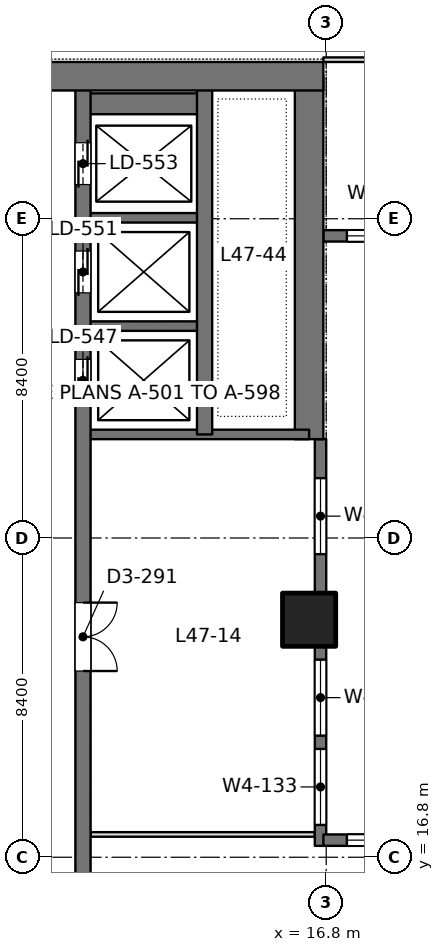
"""IFC4 building model, lengths in metres.
Left out: names, types, materials, properties, quantities, classifications, styles, units other than length and angle.
Written with IfcOpenShell. Run it as: python <this file> out.ifc"""

import sys

from ifc_helpers import new_model, si_unit, direction, frame, frame_2d, origin, origin_2d, place, context, subcontext, project, spatial, rectangle, extrude, element, fill, save


model = new_model("IFC4")
c1 = context("Model", 3, precision=1e-05, world=origin(), true_north=direction((0.0, 1.0)))
c2 = subcontext(c1, "Body", "Model", "MODEL_VIEW")
j1 = project(units=[si_unit("LENGTHUNIT", "METRE"), si_unit("PLANEANGLEUNIT", "RADIAN")], contexts=[c1])
p1 = place(None, origin())
s1 = spatial("IfcSite", under=j1, at=p1, CompositionType="ELEMENT")
p2 = place(p1, origin())
s2 = spatial("IfcBuilding", under=s1, at=p2, CompositionType="ELEMENT")
p3 = place(p2, frame((0.0, 0.0, 207.0)))
s3 = spatial("IfcBuildingStorey", under=s2, at=p3, CompositionType="ELEMENT", Elevation=207.0)
p4 = place(p3, frame((16.35, 23.05, 0.0), z_axis=(0.0, 0.0, 1.0), x_axis=(1.0, 0.0, 0.0)))
e1 = element("IfcColumn", 1, at=p4, inside=s3, PredefinedType="COLUMN", context=c2, shape_type="SweptSolid", body=[
    extrude(rectangle(XDim=1.4, YDim=1.4, at=origin_2d()), origin(), (0.0, 0.0, 1.0), 4.2),
])
p5 = place(p3, frame((-1.125, 37.35, 0.0), z_axis=(0.0, 0.0, 1.0), x_axis=(1.0, 0.0, 0.0)))
e2 = element("IfcWall", 2, at=p5, inside=s3, PredefinedType="SHEAR", context=c2, shape_type="SweptSolid", body=[
    extrude(rectangle(XDim=17.85, YDim=0.75, at=frame_2d((8.925, 0.0))), origin(), (0.0, 0.0, 1.0), 4.2),
])
p6 = place(p5, frame((8.875, 0.0, 0.0)))
e3 = element("IfcOpeningElement", 3, at=p6, cuts=e2, PredefinedType="OPENING", context=c2, shape_type="SweptSolid", body=[
    extrude(rectangle(XDim=1.8, YDim=2.4, at=frame_2d((0.9, 1.2))), frame((0.0, 0.385, 0.0), z_axis=(0.0, -1.0, 0.0), x_axis=(1.0, 0.0, 0.0)), (0.0, 0.0, 1.0), 0.77),
])
p7 = place(p3, frame((16.35, 27.8, 0.0), z_axis=(0.0, 0.0, 1.0), x_axis=(0.0, 1.0, 0.0)))
e4 = element("IfcWall", 4, at=p7, inside=s3, PredefinedType="SHEAR", context=c2, shape_type="SweptSolid", body=[
    extrude(rectangle(XDim=9.55, YDim=0.75, at=frame_2d((4.775, 0.0))), origin(), (0.0, 0.0, 1.0), 4.2),
])
p8 = place(p3, frame((10.4, 13.05, 0.0), z_axis=(0.0, 0.0, 1.0), x_axis=(0.0, 1.0, 0.0)))
e5 = element("IfcWall", 5, at=p8, inside=s3, PredefinedType="SHEAR", context=c2, shape_type="SweptSolid", body=[
    extrude(rectangle(XDim=24.3, YDim=0.4, at=frame_2d((12.15, 0.0))), origin(), (0.0, 0.0, 1.0), 4.2),
])
p9 = place(p8, frame((15.75, 0.0, 0.0)))
e6 = element("IfcOpeningElement", 6, at=p9, cuts=e5, PredefinedType="OPENING", context=c2, shape_type="SweptSolid", body=[
    extrude(rectangle(XDim=1.1, YDim=2.2, at=frame_2d((0.55, 1.1))), frame((0.0, 0.21, 0.0), z_axis=(0.0, -1.0, 0.0), x_axis=(1.0, 0.0, 0.0)), (0.0, 0.0, 1.0), 0.42),
])
p10 = place(p8, frame((18.6, 0.0, 0.0)))
e7 = element("IfcOpeningElement", 7, at=p10, cuts=e5, PredefinedType="OPENING", context=c2, shape_type="SweptSolid", body=[
    extrude(rectangle(XDim=1.1, YDim=2.2, at=frame_2d((0.55, 1.1))), frame((0.0, 0.21, 0.0), z_axis=(0.0, -1.0, 0.0), x_axis=(1.0, 0.0, 0.0)), (0.0, 0.0, 1.0), 0.42),
])
p11 = place(p8, frame((21.45, 0.0, 0.0)))
e8 = element("IfcOpeningElement", 8, at=p11, cuts=e5, PredefinedType="OPENING", context=c2, shape_type="SweptSolid", body=[
    extrude(rectangle(XDim=1.1, YDim=2.2, at=frame_2d((0.55, 1.1))), frame((0.0, 0.21, 0.0), z_axis=(0.0, -1.0, 0.0), x_axis=(1.0, 0.0, 0.0)), (0.0, 0.0, 1.0), 0.42),
])
p12 = place(p8, frame((8.65, 0.0, 0.0)))
e9 = element("IfcOpeningElement", 9, at=p12, cuts=e5, PredefinedType="OPENING", context=c2, shape_type="SweptSolid", body=[
    extrude(rectangle(XDim=1.8, YDim=2.4, at=frame_2d((0.9, 1.2))), frame((0.0, 0.21, 0.0), z_axis=(0.0, -1.0, 0.0), x_axis=(1.0, 0.0, 0.0)), (0.0, 0.0, 1.0), 0.42),
])
p13 = place(p3, frame((13.6, 27.925, 0.0), z_axis=(0.0, 0.0, 1.0), x_axis=(0.0, 1.0, 0.0)))
e10 = element("IfcWall", 10, at=p13, inside=s3, PredefinedType="SHEAR", context=c2, shape_type="SweptSolid", body=[
    extrude(rectangle(XDim=9.425, YDim=0.4, at=frame_2d((4.712, 0.0))), origin(), (0.0, 0.0, 1.0), 4.2),
])
p14 = place(p3, frame((10.4, 27.925, 0.0), z_axis=(0.0, 0.0, 1.0), x_axis=(1.0, 0.0, 0.0)))
e11 = element("IfcWall", 11, at=p14, inside=s3, PredefinedType="SHEAR", context=c2, shape_type="SweptSolid", body=[
    extrude(rectangle(XDim=5.95, YDim=0.25, at=frame_2d((2.975, 0.0))), origin(), (0.0, 0.0, 1.0), 4.2),
])
for number, where, z_axis, x_axis in (
    (12, (10.4, 30.775, 0.0), (0.0, 0.0, 1.0), (1.0, 0.0, 0.0)),
    (13, (10.4, 33.625, 0.0), (0.0, 0.0, 1.0), (1.0, 0.0, 0.0)),
):
    element("IfcWall", number, at=place(p3, frame(where, z_axis=z_axis, x_axis=x_axis)), inside=s3, PredefinedType="SHEAR", context=c2, shape_type="SweptSolid", body=[
        extrude(rectangle(XDim=3.2, YDim=0.25, at=frame_2d((1.6, 0.0))), origin(), (0.0, 0.0, 1.0), 4.2),
    ])
p15 = place(p3, frame((10.4, 36.625, 0.0), z_axis=(0.0, 0.0, 1.0), x_axis=(1.0, 0.0, 0.0)))
e14 = element("IfcWall", 14, at=p15, inside=s3, PredefinedType="SHEAR", context=c2, shape_type="SweptSolid", body=[
    extrude(rectangle(XDim=3.2, YDim=0.55, at=frame_2d((1.6, 0.0))), origin(), (0.0, 0.0, 1.0), 4.2),
])
p16 = place(p3, frame((16.65, 17.1, 0.0), z_axis=(0.0, 0.0, 1.0), x_axis=(0.0, 1.0, 0.0)))
e15 = element("IfcWall", 15, at=p16, inside=s3, PredefinedType="SOLIDWALL", context=c2, shape_type="SweptSolid", body=[
    extrude(rectangle(XDim=10.7, YDim=0.3, at=frame_2d((5.35, 0.0))), origin(), (0.0, 0.0, 1.0), 4.05),
])
p17 = place(p16, frame((0.55, 0.0, 0.9)))
e16 = element("IfcOpeningElement", 16, at=p17, cuts=e15, PredefinedType="OPENING", context=c2, shape_type="SweptSolid", body=[
    extrude(rectangle(XDim=2.0, YDim=1.9, at=frame_2d((1.0, 0.95))), frame((0.0, 0.16, 0.0), z_axis=(0.0, -1.0, 0.0), x_axis=(1.0, 0.0, 0.0)), (0.0, 0.0, 1.0), 0.32),
])
p18 = place(p16, frame((2.9, 0.0, 0.9)))
e17 = element("IfcOpeningElement", 17, at=p18, cuts=e15, PredefinedType="OPENING", context=c2, shape_type="SweptSolid", body=[
    extrude(rectangle(XDim=2.0, YDim=1.9, at=frame_2d((1.0, 0.95))), frame((0.0, 0.16, 0.0), z_axis=(0.0, -1.0, 0.0), x_axis=(1.0, 0.0, 0.0)), (0.0, 0.0, 1.0), 0.32),
])
p19 = place(p16, frame((7.675, 0.0, 0.9)))
e18 = element("IfcOpeningElement", 18, at=p19, cuts=e15, PredefinedType="OPENING", context=c2, shape_type="SweptSolid", body=[
    extrude(rectangle(XDim=2.0, YDim=1.9, at=frame_2d((1.0, 0.95))), frame((0.0, 0.16, 0.0), z_axis=(0.0, -1.0, 0.0), x_axis=(1.0, 0.0, 0.0)), (0.0, 0.0, 1.0), 0.32),
])
p20 = place(p3, frame((16.725, 17.25, 0.0), z_axis=(0.0, 0.0, 1.0), x_axis=(1.0, 0.0, 0.0)))
e19 = element("IfcWall", 19, at=p20, inside=s3, PredefinedType="SOLIDWALL", context=c2, shape_type="SweptSolid", body=[
    extrude(rectangle(XDim=7.925, YDim=0.3, at=frame_2d((3.962, 0.0))), origin(), (0.0, 0.0, 1.0), 4.05),
])
p21 = place(p20, frame((0.619, 0.0, 0.9)))
e20 = element("IfcOpeningElement", 20, at=p21, cuts=e19, PredefinedType="OPENING", context=c2, shape_type="SweptSolid", body=[
    extrude(rectangle(XDim=2.0, YDim=1.9, at=frame_2d((1.0, 0.95))), frame((0.0, 0.16, 0.0), z_axis=(0.0, -1.0, 0.0), x_axis=(1.0, 0.0, 0.0)), (0.0, 0.0, 1.0), 0.32),
])
p22 = place(p20, frame((3.238, 0.0, 0.9)))
e21 = element("IfcOpeningElement", 21, at=p22, cuts=e19, PredefinedType="OPENING", context=c2, shape_type="SweptSolid", body=[
    extrude(rectangle(XDim=2.0, YDim=1.9, at=frame_2d((1.0, 0.95))), frame((0.0, 0.16, 0.0), z_axis=(0.0, -1.0, 0.0), x_axis=(1.0, 0.0, 0.0)), (0.0, 0.0, 1.0), 0.32),
])
p23 = place(p20, frame((5.856, 0.0, 0.9)))
e22 = element("IfcOpeningElement", 22, at=p23, cuts=e19, PredefinedType="OPENING", context=c2, shape_type="SweptSolid", body=[
    extrude(rectangle(XDim=2.0, YDim=1.9, at=frame_2d((1.0, 0.95))), frame((0.0, 0.16, 0.0), z_axis=(0.0, -1.0, 0.0), x_axis=(1.0, 0.0, 0.0)), (0.0, 0.0, 1.0), 0.32),
])
p24 = place(p3, frame((16.725, 33.15, 0.0), z_axis=(0.0, 0.0, 1.0), x_axis=(1.0, 0.0, 0.0)))
e23 = element("IfcWall", 23, at=p24, inside=s3, PredefinedType="SOLIDWALL", context=c2, shape_type="SweptSolid", body=[
    extrude(rectangle(XDim=7.925, YDim=0.3, at=frame_2d((3.962, 0.0))), origin(), (0.0, 0.0, 1.0), 4.05),
])
p25 = place(p24, frame((0.619, 0.0, 0.9)))
e24 = element("IfcOpeningElement", 24, at=p25, cuts=e23, PredefinedType="OPENING", context=c2, shape_type="SweptSolid", body=[
    extrude(rectangle(XDim=2.0, YDim=1.9, at=frame_2d((1.0, 0.95))), frame((0.0, 0.16, 0.0), z_axis=(0.0, -1.0, 0.0), x_axis=(1.0, 0.0, 0.0)), (0.0, 0.0, 1.0), 0.32),
])
p26 = place(p24, frame((3.238, 0.0, 0.9)))
e25 = element("IfcOpeningElement", 25, at=p26, cuts=e23, PredefinedType="OPENING", context=c2, shape_type="SweptSolid", body=[
    extrude(rectangle(XDim=2.0, YDim=1.9, at=frame_2d((1.0, 0.95))), frame((0.0, 0.16, 0.0), z_axis=(0.0, -1.0, 0.0), x_axis=(1.0, 0.0, 0.0)), (0.0, 0.0, 1.0), 0.32),
])
p27 = place(p24, frame((5.856, 0.0, 0.9)))
e26 = element("IfcOpeningElement", 26, at=p27, cuts=e23, PredefinedType="OPENING", context=c2, shape_type="SweptSolid", body=[
    extrude(rectangle(XDim=2.0, YDim=1.9, at=frame_2d((1.0, 0.95))), frame((0.0, 0.16, 0.0), z_axis=(0.0, -1.0, 0.0), x_axis=(1.0, 0.0, 0.0)), (0.0, 0.0, 1.0), 0.32),
])
p28 = place(p3, frame((10.598, 17.4, 0.0), z_axis=(0.0, 0.0, 1.0), x_axis=(1.0, 0.0, 0.0)))
e27 = element("IfcWall", 27, at=p28, inside=s3, PredefinedType="PARTITIONING", context=c2, shape_type="SweptSolid", body=[
    extrude(rectangle(XDim=5.904, YDim=0.12, at=frame_2d((2.952, 0.0))), origin(), (0.0, 0.0, 1.0), 3.55),
])
p29 = place(p3, frame((16.725, 37.785, 0.0), z_axis=(0.0, 0.0, 1.0), x_axis=(1.0, 0.0, 0.0)))
e28 = element("IfcWall", 28, at=p29, inside=s3, PredefinedType="PARTITIONING", context=c2, shape_type="SweptSolid", body=[
    extrude(rectangle(XDim=16.95, YDim=0.12, at=frame_2d((8.475, 0.0))), origin(), (0.0, 0.0, 1.0), 3.55),
])
p30 = place(p29, frame((7.575, 0.0, 0.0)))
e29 = element("IfcOpeningElement", 29, at=p30, cuts=e28, PredefinedType="OPENING", context=c2, shape_type="SweptSolid", body=[
    extrude(rectangle(XDim=1.8, YDim=2.2, at=frame_2d((0.9, 1.1))), frame((0.0, 0.07, 0.0), z_axis=(0.0, -1.0, 0.0), x_axis=(1.0, 0.0, 0.0)), (0.0, 0.0, 1.0), 0.14),
])
p31 = place(p17, origin())
e30 = element("IfcWindow", 30, at=p31, inside=s3, PartitioningType="SINGLE_PANEL", PredefinedType="WINDOW", context=c2, shape_type="SweptSolid", body=[
    extrude(rectangle(XDim=2.0, YDim=1.9, at=frame_2d((1.0, 0.95))), frame((0.0, 0.03, 0.0), z_axis=(0.0, -1.0, 0.0), x_axis=(1.0, 0.0, 0.0)), (0.0, 0.0, 1.0), 0.06),
])
fill(e16, e30)
p32 = place(p18, origin())
e31 = element("IfcWindow", 31, at=p32, inside=s3, PartitioningType="SINGLE_PANEL", PredefinedType="WINDOW", context=c2, shape_type="SweptSolid", body=[
    extrude(rectangle(XDim=2.0, YDim=1.9, at=frame_2d((1.0, 0.95))), frame((0.0, 0.03, 0.0), z_axis=(0.0, -1.0, 0.0), x_axis=(1.0, 0.0, 0.0)), (0.0, 0.0, 1.0), 0.06),
])
fill(e17, e31)
p33 = place(p19, origin())
e32 = element("IfcWindow", 32, at=p33, inside=s3, PartitioningType="SINGLE_PANEL", PredefinedType="WINDOW", context=c2, shape_type="SweptSolid", body=[
    extrude(rectangle(XDim=2.0, YDim=1.9, at=frame_2d((1.0, 0.95))), frame((0.0, 0.03, 0.0), z_axis=(0.0, -1.0, 0.0), x_axis=(1.0, 0.0, 0.0)), (0.0, 0.0, 1.0), 0.06),
])
fill(e18, e32)
p34 = place(p21, origin())
e33 = element("IfcWindow", 33, at=p34, inside=s3, PartitioningType="SINGLE_PANEL", PredefinedType="WINDOW", context=c2, shape_type="SweptSolid", body=[
    extrude(rectangle(XDim=2.0, YDim=1.9, at=frame_2d((1.0, 0.95))), frame((0.0, 0.03, 0.0), z_axis=(0.0, -1.0, 0.0), x_axis=(1.0, 0.0, 0.0)), (0.0, 0.0, 1.0), 0.06),
])
fill(e20, e33)
p35 = place(p25, origin())
e34 = element("IfcWindow", 34, at=p35, inside=s3, PartitioningType="SINGLE_PANEL", PredefinedType="WINDOW", context=c2, shape_type="SweptSolid", body=[
    extrude(rectangle(XDim=2.0, YDim=1.9, at=frame_2d((1.0, 0.95))), frame((0.0, 0.03, 0.0), z_axis=(0.0, -1.0, 0.0), x_axis=(1.0, 0.0, 0.0)), (0.0, 0.0, 1.0), 0.06),
])
fill(e24, e34)
p36 = place(p9, origin())
e35 = element("IfcDoor", 35, at=p36, inside=s3, OperationType="DOUBLE_DOOR_SLIDING", PredefinedType="DOOR", context=c2, shape_type="SweptSolid", body=[
    extrude(rectangle(XDim=1.1, YDim=2.2, at=frame_2d((0.55, 1.1))), frame((0.0, 0.025, 0.0), z_axis=(0.0, -1.0, 0.0), x_axis=(1.0, 0.0, 0.0)), (0.0, 0.0, 1.0), 0.05),
])
fill(e6, e35)
p37 = place(p10, origin())
e36 = element("IfcDoor", 36, at=p37, inside=s3, OperationType="DOUBLE_DOOR_SLIDING", PredefinedType="DOOR", context=c2, shape_type="SweptSolid", body=[
    extrude(rectangle(XDim=1.1, YDim=2.2, at=frame_2d((0.55, 1.1))), frame((0.0, 0.025, 0.0), z_axis=(0.0, -1.0, 0.0), x_axis=(1.0, 0.0, 0.0)), (0.0, 0.0, 1.0), 0.05),
])
fill(e7, e36)
p38 = place(p11, origin())
e37 = element("IfcDoor", 37, at=p38, inside=s3, OperationType="DOUBLE_DOOR_SLIDING", PredefinedType="DOOR", context=c2, shape_type="SweptSolid", body=[
    extrude(rectangle(XDim=1.1, YDim=2.2, at=frame_2d((0.55, 1.1))), frame((0.0, 0.025, 0.0), z_axis=(0.0, -1.0, 0.0), x_axis=(1.0, 0.0, 0.0)), (0.0, 0.0, 1.0), 0.05),
])
fill(e8, e37)
p39 = place(p12, frame((1.8, 0.0, 0.0), z_axis=(0.0, 0.0, 1.0), x_axis=(-1.0, 0.0, 0.0)))
e38 = element("IfcDoor", 38, at=p39, inside=s3, OperationType="DOUBLE_DOOR_SINGLE_SWING", PredefinedType="DOOR", context=c2, shape_type="SweptSolid", body=[
    extrude(rectangle(XDim=1.8, YDim=2.4, at=frame_2d((0.9, 1.2))), frame((0.0, 0.025, 0.0), z_axis=(0.0, -1.0, 0.0), x_axis=(1.0, 0.0, 0.0)), (0.0, 0.0, 1.0), 0.05),
])
fill(e9, e38)
save(model, sys.argv[1])
